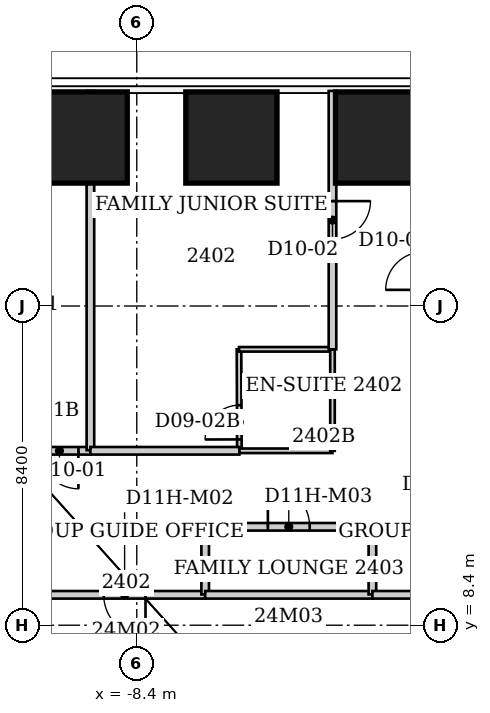
"""IFC4 building model, lengths in metres.
Left out: names, types, materials, properties, quantities, classifications, styles, units other than length and angle.
Written with IfcOpenShell. Run it as: python <this file> out.ifc"""

import sys

from ifc_helpers import new_model, si_unit, direction, frame, frame_2d, origin, origin_2d, place, context, subcontext, project, spatial, rectangle, extrude, element, fill, save


model = new_model("IFC4")
c1 = context("Model", 3, precision=1e-05, world=origin(), true_north=direction((0.0, 1.0)))
c2 = subcontext(c1, "Body", "Model", "MODEL_VIEW")
j1 = project(units=[si_unit("LENGTHUNIT", "METRE"), si_unit("PLANEANGLEUNIT", "RADIAN")], contexts=[c1])
p1 = place(None, origin())
s1 = spatial("IfcSite", under=j1, at=p1, CompositionType="ELEMENT")
p2 = place(p1, origin())
s2 = spatial("IfcBuilding", under=s1, at=p2, CompositionType="ELEMENT")
p3 = place(p2, frame((0.0, 0.0, 100.6)))
s3 = spatial("IfcBuildingStorey", under=s2, at=p3, CompositionType="ELEMENT", Elevation=100.6)
for number, where, z_axis, x_axis in (
    (1, (-9.85, 21.234, 0.0), (0.0, 0.0, 1.0), (0.0, 1.0, 0.0)),
    (2, (-5.91, 21.234, 0.0), (0.0, 0.0, 1.0), (0.0, 1.0, 0.0)),
    (3, (-1.97, 21.234, 0.0), (0.0, 0.0, 1.0), (0.0, 1.0, 0.0)),
):
    element("IfcColumn", number, at=place(p3, frame(where, z_axis=z_axis, x_axis=x_axis)), inside=s3, PredefinedType="COLUMN", context=c2, shape_type="SweptSolid", body=[
        extrude(rectangle(XDim=2.4, YDim=2.4, at=origin_2d()), origin(), (0.0, 0.0, 1.0), 3.8),
    ])
p4 = place(p3, frame((-11.01, 10.32, 0.0), z_axis=(0.0, 0.0, 1.0), x_axis=(0.503009091795, 0.864281119527, 0.0)))
e4 = element("IfcWall", 4, at=p4, inside=s3, PredefinedType="PARTITIONING", context=c2, shape_type="SweptSolid", body=[
    extrude(rectangle(XDim=0.775, YDim=0.2, at=frame_2d((0.388, 0.0))), origin(), (0.0, 0.0, 1.0), 3.64),
])
p5 = place(p3, frame((-10.62, 10.99, 0.0), z_axis=(0.0, 0.0, 1.0), x_axis=(1.0, 0.0, 0.0)))
e5 = element("IfcWall", 5, at=p5, inside=s3, PredefinedType="PARTITIONING", context=c2, shape_type="SweptSolid", body=[
    extrude(rectangle(XDim=4.02, YDim=0.2, at=frame_2d((2.01, 0.0))), origin(), (0.0, 0.0, 1.0), 3.64),
])
p6 = place(p3, frame((-9.62, 12.99, 0.0), z_axis=(0.0, 0.0, 1.0), x_axis=(-1.0, 0.0, 0.0)))
e6 = element("IfcWall", 6, at=p6, inside=s3, PredefinedType="PARTITIONING", context=c2, shape_type="SweptSolid", body=[
    extrude(rectangle(XDim=1.63, YDim=0.2, at=frame_2d((0.815, 0.0))), origin(), (0.0, 0.0, 1.0), 3.64),
])
p7 = place(p6, frame((0.315, 0.0, 0.0)))
e7 = element("IfcOpeningElement", 7, at=p7, cuts=e6, PredefinedType="OPENING", context=c2, shape_type="SweptSolid", body=[
    extrude(rectangle(XDim=1.0, YDim=2.13, at=frame_2d((0.5, 1.065))), frame((0.0, 0.1, 0.0), z_axis=(0.0, -1.0, 0.0), x_axis=(1.0, 0.0, 0.0)), (0.0, 0.0, 1.0), 0.2),
])
p8 = place(p3, frame((-9.62, 22.46, 0.0), z_axis=(0.0, 0.0, 1.0), x_axis=(0.0, -1.0, 0.0)))
e8 = element("IfcWall", 8, at=p8, inside=s3, PredefinedType="PARTITIONING", context=c2, shape_type="SweptSolid", body=[
    extrude(rectangle(XDim=9.455, YDim=0.2, at=frame_2d((4.728, 0.0))), origin(), (0.0, 0.0, 1.0), 3.64),
])
p9 = place(p3, frame((-6.6, 9.2, 0.0), z_axis=(0.0, 0.0, 1.0), x_axis=(-1.0, 0.0, 0.0)))
e9 = element("IfcWall", 9, at=p9, inside=s3, PredefinedType="PARTITIONING", context=c2, shape_type="SweptSolid", body=[
    extrude(rectangle(XDim=4.24, YDim=0.2, at=frame_2d((2.12, 0.0))), origin(), (0.0, 0.0, 1.0), 3.64),
])
p10 = place(p9, frame((1.57, 0.0, 0.0)))
e10 = element("IfcOpeningElement", 10, at=p10, cuts=e9, PredefinedType="OPENING", context=c2, shape_type="SweptSolid", body=[
    extrude(rectangle(XDim=1.1, YDim=2.2, at=frame_2d((0.55, 1.1))), frame((0.0, 0.1, 0.0), z_axis=(0.0, -1.0, 0.0), x_axis=(1.0, 0.0, 0.0)), (0.0, 0.0, 1.0), 0.2),
])
p11 = place(p3, frame((-6.6, 10.98, 0.0), z_axis=(0.0, 0.0, 1.0), x_axis=(0.0, -1.0, 0.0)))
e11 = element("IfcWall", 11, at=p11, inside=s3, PredefinedType="PARTITIONING", context=c2, shape_type="SweptSolid", body=[
    extrude(rectangle(XDim=1.77, YDim=0.2, at=frame_2d((0.885, 0.0))), origin(), (0.0, 0.0, 1.0), 3.64),
])
p12 = place(p3, frame((-6.6, 10.99, 0.0), z_axis=(0.0, 0.0, 1.0), x_axis=(1.0, 0.0, 0.0)))
e12 = element("IfcWall", 12, at=p12, inside=s3, PredefinedType="PARTITIONING", context=c2, shape_type="SweptSolid", body=[
    extrude(rectangle(XDim=4.4, YDim=0.2, at=frame_2d((2.2, 0.0))), origin(), (0.0, 0.0, 1.0), 3.64),
])
p13 = place(p12, frame((1.65, 0.0, 0.0)))
e13 = element("IfcOpeningElement", 13, at=p13, cuts=e12, PredefinedType="OPENING", context=c2, shape_type="SweptSolid", body=[
    extrude(rectangle(XDim=1.1, YDim=2.2, at=frame_2d((0.55, 1.1))), frame((0.0, 0.1, 0.0), z_axis=(0.0, -1.0, 0.0), x_axis=(1.0, 0.0, 0.0)), (0.0, 0.0, 1.0), 0.2),
])
p14 = place(p3, frame((-5.71, 15.66, 0.0), z_axis=(0.0, 0.0, 1.0), x_axis=(0.003749059241, -0.999992972253, 0.0)))
e14 = element("IfcWall", 14, at=p14, inside=s3, PredefinedType="PARTITIONING", context=c2, shape_type="SweptSolid", body=[
    extrude(rectangle(XDim=2.67, YDim=0.12, at=frame_2d((1.335, 0.0))), origin(), (0.0, 0.0, 1.0), 3.64),
])
p15 = place(p14, frame((1.47, 0.0, 0.0)))
e15 = element("IfcOpeningElement", 15, at=p15, cuts=e14, PredefinedType="OPENING", context=c2, shape_type="SweptSolid", body=[
    extrude(rectangle(XDim=0.9, YDim=2.03, at=frame_2d((0.45, 1.015))), frame((0.0, 0.06, 0.0), z_axis=(0.0, -1.0, 0.0), x_axis=(1.0, 0.0, 0.0)), (0.0, 0.0, 1.0), 0.12),
])
p16 = place(p3, frame((-5.7, 12.99, 0.0), z_axis=(0.0, 0.0, 1.0), x_axis=(-1.0, 0.0, 0.0)))
e16 = element("IfcWall", 16, at=p16, inside=s3, PredefinedType="PARTITIONING", context=c2, shape_type="SweptSolid", body=[
    extrude(rectangle(XDim=3.92, YDim=0.2, at=frame_2d((1.96, 0.0))), origin(), (0.0, 0.0, 1.0), 3.64),
])
p17 = place(p3, frame((-3.25, 12.99, 0.0), z_axis=(0.0, 0.0, 1.0), x_axis=(-1.0, 0.0, 0.0)))
e17 = element("IfcWall", 17, at=p17, inside=s3, PredefinedType="PARTITIONING", context=c2, shape_type="SweptSolid", body=[
    extrude(rectangle(XDim=2.45, YDim=0.12, at=frame_2d((1.225, 0.0))), origin(), (0.0, 0.0, 1.0), 3.64),
])
p18 = place(p3, frame((-3.25, 15.66, 0.0), z_axis=(0.0, 0.0, 1.0), x_axis=(-1.0, 0.0, 0.0)))
e18 = element("IfcWall", 18, at=p18, inside=s3, PredefinedType="PARTITIONING", context=c2, shape_type="SweptSolid", body=[
    extrude(rectangle(XDim=2.46, YDim=0.12, at=frame_2d((1.23, 0.0))), origin(), (0.0, 0.0, 1.0), 3.64),
])
p19 = place(p3, frame((-3.25, 15.66, 0.0), z_axis=(0.0, 0.0, 1.0), x_axis=(0.0, -1.0, 0.0)))
e19 = element("IfcWall", 19, at=p19, inside=s3, PredefinedType="PARTITIONING", context=c2, shape_type="SweptSolid", body=[
    extrude(rectangle(XDim=2.67, YDim=0.12, at=frame_2d((1.335, 0.0))), origin(), (0.0, 0.0, 1.0), 3.64),
])
p20 = place(p3, frame((-3.25, 22.46, 0.0), z_axis=(0.0, 0.0, 1.0), x_axis=(0.0, -1.0, 0.0)))
e20 = element("IfcWall", 20, at=p20, inside=s3, PredefinedType="PARTITIONING", context=c2, shape_type="SweptSolid", body=[
    extrude(rectangle(XDim=6.8, YDim=0.2, at=frame_2d((3.4, 0.0))), origin(), (0.0, 0.0, 1.0), 3.64),
])
p21 = place(p20, frame((2.9, 0.0, 0.0)))
e21 = element("IfcOpeningElement", 21, at=p21, cuts=e20, PredefinedType="OPENING", context=c2, shape_type="SweptSolid", body=[
    extrude(rectangle(XDim=1.0, YDim=2.13, at=frame_2d((0.5, 1.065))), frame((0.0, 0.1, 0.0), z_axis=(0.0, -1.0, 0.0), x_axis=(1.0, 0.0, 0.0)), (0.0, 0.0, 1.0), 0.2),
])
p22 = place(p3, frame((-2.2, 9.2, 0.0), z_axis=(0.0, 0.0, 1.0), x_axis=(-1.0, 0.0, 0.0)))
e22 = element("IfcWall", 22, at=p22, inside=s3, PredefinedType="PARTITIONING", context=c2, shape_type="SweptSolid", body=[
    extrude(rectangle(XDim=4.4, YDim=0.2, at=frame_2d((2.2, 0.0))), origin(), (0.0, 0.0, 1.0), 3.64),
])
p23 = place(p3, frame((-2.2, 10.98, 0.0), z_axis=(0.0, 0.0, 1.0), x_axis=(0.0, -1.0, 0.0)))
e23 = element("IfcWall", 23, at=p23, inside=s3, PredefinedType="PARTITIONING", context=c2, shape_type="SweptSolid", body=[
    extrude(rectangle(XDim=1.77, YDim=0.2, at=frame_2d((0.885, 0.0))), origin(), (0.0, 0.0, 1.0), 3.64),
])
p24 = place(p3, frame((-2.2, 10.99, 0.0), z_axis=(0.0, 0.0, 1.0), x_axis=(1.0, 0.0, 0.0)))
e24 = element("IfcWall", 24, at=p24, inside=s3, PredefinedType="PARTITIONING", context=c2, shape_type="SweptSolid", body=[
    extrude(rectangle(XDim=4.4, YDim=0.2, at=frame_2d((2.2, 0.0))), origin(), (0.0, 0.0, 1.0), 3.64),
])
p25 = place(p24, frame((1.65, 0.0, 0.0)))
e25 = element("IfcOpeningElement", 25, at=p25, cuts=e24, PredefinedType="OPENING", context=c2, shape_type="SweptSolid", body=[
    extrude(rectangle(XDim=1.1, YDim=2.2, at=frame_2d((0.55, 1.1))), frame((0.0, 0.1, 0.0), z_axis=(0.0, -1.0, 0.0), x_axis=(1.0, 0.0, 0.0)), (0.0, 0.0, 1.0), 0.2),
])
p26 = place(p3, frame((2.2, 9.2, 0.0), z_axis=(0.0, 0.0, 1.0), x_axis=(-1.0, 0.0, 0.0)))
e26 = element("IfcWall", 26, at=p26, inside=s3, PredefinedType="PARTITIONING", context=c2, shape_type="SweptSolid", body=[
    extrude(rectangle(XDim=4.4, YDim=0.2, at=frame_2d((2.2, 0.0))), origin(), (0.0, 0.0, 1.0), 3.64),
])
p27 = place(p7, origin())
e27 = element("IfcDoor", 27, at=p27, inside=s3, OperationType="SINGLE_SWING_LEFT", PredefinedType="DOOR", context=c2, shape_type="SweptSolid", body=[
    extrude(rectangle(XDim=1.0, YDim=2.13, at=frame_2d((0.5, 1.065))), frame((0.0, 0.025, 0.0), z_axis=(0.0, -1.0, 0.0), x_axis=(1.0, 0.0, 0.0)), (0.0, 0.0, 1.0), 0.05),
])
fill(e7, e27)
p28 = place(p21, origin())
e28 = element("IfcDoor", 28, at=p28, inside=s3, OperationType="SINGLE_SWING_LEFT", PredefinedType="DOOR", context=c2, shape_type="SweptSolid", body=[
    extrude(rectangle(XDim=1.0, YDim=2.13, at=frame_2d((0.5, 1.065))), frame((0.0, 0.025, 0.0), z_axis=(0.0, -1.0, 0.0), x_axis=(1.0, 0.0, 0.0)), (0.0, 0.0, 1.0), 0.05),
])
fill(e21, e28)
p29 = place(p15, origin())
e29 = element("IfcDoor", 29, at=p29, inside=s3, OperationType="SINGLE_SWING_RIGHT", PredefinedType="DOOR", context=c2, shape_type="SweptSolid", body=[
    extrude(rectangle(XDim=0.9, YDim=2.03, at=frame_2d((0.45, 1.015))), frame((0.0, 0.025, 0.0), z_axis=(0.0, -1.0, 0.0), x_axis=(1.0, 0.0, 0.0)), (0.0, 0.0, 1.0), 0.05),
])
fill(e15, e29)
p30 = place(p10, origin())
e30 = element("IfcDoor", 30, at=p30, inside=s3, OperationType="SINGLE_SWING_LEFT", PredefinedType="DOOR", context=c2, shape_type="SweptSolid", body=[
    extrude(rectangle(XDim=1.1, YDim=2.2, at=frame_2d((0.55, 1.1))), frame((0.0, 0.025, 0.0), z_axis=(0.0, -1.0, 0.0), x_axis=(1.0, 0.0, 0.0)), (0.0, 0.0, 1.0), 0.05),
])
fill(e10, e30)
p31 = place(p13, origin())
e31 = element("IfcDoor", 31, at=p31, inside=s3, OperationType="SINGLE_SWING_LEFT", PredefinedType="DOOR", context=c2, shape_type="SweptSolid", body=[
    extrude(rectangle(XDim=1.1, YDim=2.2, at=frame_2d((0.55, 1.1))), frame((0.0, 0.025, 0.0), z_axis=(0.0, -1.0, 0.0), x_axis=(1.0, 0.0, 0.0)), (0.0, 0.0, 1.0), 0.05),
])
fill(e13, e31)
save(model, sys.argv[1])
